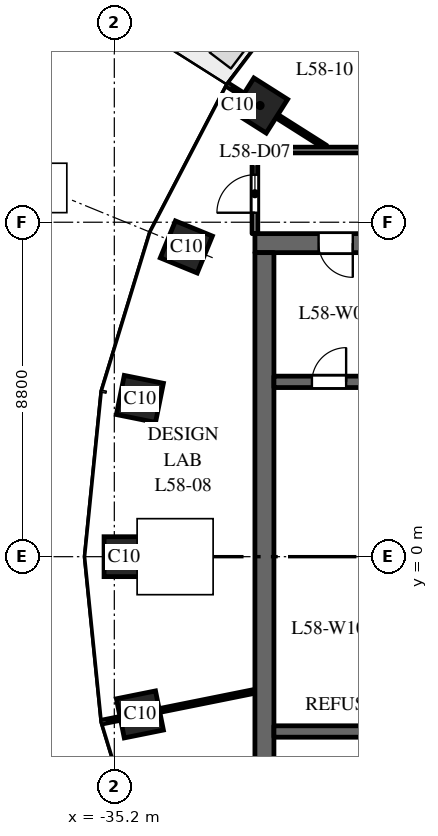
"""IFC4 building model, lengths in metres.
Left out: names, types, materials, properties, quantities, classifications, styles, units other than length and angle.
Written with IfcOpenShell. Run it as: python <this file> out.ifc"""

import sys

from ifc_helpers import new_model, si_unit, direction, frame, frame_2d, origin, origin_2d, place, context, subcontext, project, spatial, rectangle, extrude, element, fill, save


model = new_model("IFC4")
c1 = context("Model", 3, precision=1e-05, world=origin(), true_north=direction((0.0, 1.0)))
c2 = subcontext(c1, "Body", "Model", "MODEL_VIEW")
j1 = project(units=[si_unit("LENGTHUNIT", "METRE"), si_unit("PLANEANGLEUNIT", "RADIAN")], contexts=[c1])
p1 = place(None, origin())
s1 = spatial("IfcSite", under=j1, at=p1, CompositionType="ELEMENT")
p2 = place(p1, origin())
s2 = spatial("IfcBuilding", under=s1, at=p2, CompositionType="ELEMENT")
p3 = place(p2, frame((0.0, 0.0, 273.5)))
s3 = spatial("IfcBuildingStorey", under=s2, at=p3, CompositionType="ELEMENT", Elevation=273.5)
for number, where, z_axis, x_axis in (
    (1, (-31.365, 11.871, 0.0), (0.0, 0.0, 1.0), (-0.535, -0.845, 0.0)),
    (2, (-33.305, 8.149, 0.0), (0.0, 0.0, 1.0), (-0.379, -0.925, 0.0)),
    (3, (-34.527, 4.151, 0.0), (0.0, 0.0, 1.0), (-0.197, -0.98, 0.0)),
    (4, (-34.945, 0.0, 0.0), (0.0, 0.0, 1.0), (0.0, -1.0, 0.0)),
    (5, (-34.527, -4.151, 0.0), (0.0, 0.0, 1.0), (0.197, -0.98, 0.0)),
):
    element("IfcColumn", number, at=place(p3, frame(where, z_axis=z_axis, x_axis=x_axis)), inside=s3, PredefinedType="COLUMN", context=c2, shape_type="SweptSolid", body=[
        extrude(rectangle(XDim=1.05, YDim=1.05, at=origin_2d()), origin(), (0.0, 0.0, 1.0), 4.0),
    ])
p4 = place(p3, frame((-16.5, 8.25, 0.0), z_axis=(0.0, 0.0, 1.0), x_axis=(-1.0, 0.0, 0.0)))
e6 = element("IfcWall", 6, at=p4, inside=s3, PredefinedType="SHEAR", context=c2, shape_type="SweptSolid", body=[
    extrude(rectangle(XDim=15.0, YDim=0.5, at=frame_2d((7.5, 0.0))), origin(), (0.0, 0.0, 1.0), 3.7),
])
p5 = place(p4, frame((6.9, 0.0, 0.0)))
e7 = element("IfcOpeningElement", 7, at=p5, cuts=e6, PredefinedType="OPENING", context=c2, shape_type="SweptSolid", body=[
    extrude(rectangle(XDim=1.2, YDim=2.1, at=frame_2d((0.6, 1.05))), frame((0.0, 0.26, 0.0), z_axis=(0.0, -1.0, 0.0), x_axis=(1.0, 0.0, 0.0)), (0.0, 0.0, 1.0), 0.52),
])
p6 = place(p4, frame((12.425, 0.0, 0.0)))
e8 = element("IfcOpeningElement", 8, at=p6, cuts=e6, PredefinedType="OPENING", context=c2, shape_type="SweptSolid", body=[
    extrude(rectangle(XDim=0.9, YDim=2.1, at=frame_2d((0.45, 1.05))), frame((0.0, 0.26, 0.0), z_axis=(0.0, -1.0, 0.0), x_axis=(1.0, 0.0, 0.0)), (0.0, 0.0, 1.0), 0.52),
])
p7 = place(p3, frame((-31.25, -8.0, 0.0), z_axis=(0.0, 0.0, 1.0), x_axis=(0.0, 1.0, 0.0)))
e9 = element("IfcWall", 9, at=p7, inside=s3, PredefinedType="SHEAR", context=c2, shape_type="SweptSolid", body=[
    extrude(rectangle(XDim=16.0, YDim=0.5, at=frame_2d((8.0, 0.0))), origin(), (0.0, 0.0, 1.0), 3.7),
])
p8 = place(p3, frame((-24.9, 4.6, 0.0), z_axis=(0.0, 0.0, 1.0), x_axis=(-1.0, 0.0, 0.0)))
e10 = element("IfcWall", 10, at=p8, inside=s3, PredefinedType="SHEAR", context=c2, shape_type="SweptSolid", body=[
    extrude(rectangle(XDim=6.1, YDim=0.3, at=frame_2d((3.05, 0.0))), origin(), (0.0, 0.0, 1.0), 3.7),
])
p9 = place(p8, frame((4.2, 0.0, 0.0)))
e11 = element("IfcOpeningElement", 11, at=p9, cuts=e10, PredefinedType="OPENING", context=c2, shape_type="SweptSolid", body=[
    extrude(rectangle(XDim=0.9, YDim=2.1, at=frame_2d((0.45, 1.05))), frame((0.0, 0.16, 0.0), z_axis=(0.0, -1.0, 0.0), x_axis=(1.0, 0.0, 0.0)), (0.0, 0.0, 1.0), 0.32),
])
p10 = place(p3, frame((-24.9, -4.6, 0.0), z_axis=(0.0, 0.0, 1.0), x_axis=(-1.0, 0.0, 0.0)))
e12 = element("IfcWall", 12, at=p10, inside=s3, PredefinedType="SHEAR", context=c2, shape_type="SweptSolid", body=[
    extrude(rectangle(XDim=6.1, YDim=0.3, at=frame_2d((3.05, 0.0))), origin(), (0.0, 0.0, 1.0), 3.7),
])
p11 = place(p3, frame((-35.512, -4.349, 0.0), z_axis=(0.0, 0.0, 1.0), x_axis=(0.980357474535, 0.197228857227, 0.0)))
e13 = element("IfcWall", 13, at=p11, inside=s3, PredefinedType="PARTITIONING", context=c2, shape_type="SweptSolid", body=[
    extrude(rectangle(XDim=4.092, YDim=0.1, at=frame_2d((2.046, 0.0))), origin(), (0.0, 0.0, 1.0), 3.2),
])
p12 = place(p3, frame((-32.212, 12.408, 0.0), z_axis=(0.0, 0.0, 1.0), x_axis=(0.844810627195, -0.535065420467, 0.0)))
e14 = element("IfcWall", 14, at=p12, inside=s3, PredefinedType="PARTITIONING", context=c2, shape_type="SweptSolid", body=[
    extrude(rectangle(XDim=3.048, YDim=0.1, at=frame_2d((1.524, 0.0))), origin(), (0.0, 0.0, 1.0), 3.7),
])
p13 = place(p3, frame((-31.5, 8.5, 0.0), z_axis=(0.0, 0.0, 1.0), x_axis=(0.0, 1.0, 0.0)))
e15 = element("IfcWall", 15, at=p13, inside=s3, PredefinedType="PARTITIONING", context=c2, shape_type="SweptSolid", body=[
    extrude(rectangle(XDim=2.2, YDim=0.15, at=frame_2d((1.1, 0.0))), origin(), (0.0, 0.0, 1.0), 3.7),
])
p14 = place(p13, frame((0.55, 0.0, 0.0)))
e16 = element("IfcOpeningElement", 16, at=p14, cuts=e15, PredefinedType="OPENING", context=c2, shape_type="SweptSolid", body=[
    extrude(rectangle(XDim=1.0, YDim=2.1, at=frame_2d((0.5, 1.05))), frame((0.0, 0.085, 0.0), z_axis=(0.0, -1.0, 0.0), x_axis=(1.0, 0.0, 0.0)), (0.0, 0.0, 1.0), 0.17),
])
p15 = place(p3, frame((-31.5, 10.7, 0.0), z_axis=(0.0, 0.0, 1.0), x_axis=(1.0, 0.0, 0.0)))
e17 = element("IfcWall", 17, at=p15, inside=s3, PredefinedType="PARTITIONING", context=c2, shape_type="SweptSolid", body=[
    extrude(rectangle(XDim=15.0, YDim=0.15, at=frame_2d((7.5, 0.0))), origin(), (0.0, 0.0, 1.0), 3.1),
])
p16 = place(p15, frame((6.405, 0.0, 0.0)))
e18 = element("IfcOpeningElement", 18, at=p16, cuts=e17, PredefinedType="OPENING", context=c2, shape_type="SweptSolid", body=[
    extrude(rectangle(XDim=1.0, YDim=2.1, at=frame_2d((0.5, 1.05))), frame((0.0, 0.085, 0.0), z_axis=(0.0, -1.0, 0.0), x_axis=(1.0, 0.0, 0.0)), (0.0, 0.0, 1.0), 0.17),
])
p17 = place(p15, frame((13.1, 0.0, 0.0)))
e19 = element("IfcOpeningElement", 19, at=p17, cuts=e17, PredefinedType="OPENING", context=c2, shape_type="SweptSolid", body=[
    extrude(rectangle(XDim=1.0, YDim=2.1, at=frame_2d((0.5, 1.05))), frame((0.0, 0.085, 0.0), z_axis=(0.0, -1.0, 0.0), x_axis=(1.0, 0.0, 0.0)), (0.0, 0.0, 1.0), 0.17),
])
p18 = place(p6, origin())
e20 = element("IfcDoor", 20, at=p18, inside=s3, OperationType="SINGLE_SWING_RIGHT", PredefinedType="DOOR", context=c2, shape_type="SweptSolid", body=[
    extrude(rectangle(XDim=0.9, YDim=2.1, at=frame_2d((0.45, 1.05))), frame((0.0, 0.025, 0.0), z_axis=(0.0, -1.0, 0.0), x_axis=(1.0, 0.0, 0.0)), (0.0, 0.0, 1.0), 0.05),
])
fill(e8, e20)
p19 = place(p9, origin())
e21 = element("IfcDoor", 21, at=p19, inside=s3, OperationType="SINGLE_SWING_LEFT", PredefinedType="DOOR", context=c2, shape_type="SweptSolid", body=[
    extrude(rectangle(XDim=0.9, YDim=2.1, at=frame_2d((0.45, 1.05))), frame((0.0, 0.025, 0.0), z_axis=(0.0, -1.0, 0.0), x_axis=(1.0, 0.0, 0.0)), (0.0, 0.0, 1.0), 0.05),
])
fill(e11, e21)
p20 = place(p14, origin())
e22 = element("IfcDoor", 22, at=p20, inside=s3, OperationType="SINGLE_SWING_LEFT", PredefinedType="DOOR", context=c2, shape_type="SweptSolid", body=[
    extrude(rectangle(XDim=1.0, YDim=2.1, at=frame_2d((0.5, 1.05))), frame((0.0, 0.025, 0.0), z_axis=(0.0, -1.0, 0.0), x_axis=(1.0, 0.0, 0.0)), (0.0, 0.0, 1.0), 0.05),
])
fill(e16, e22)
save(model, sys.argv[1])
